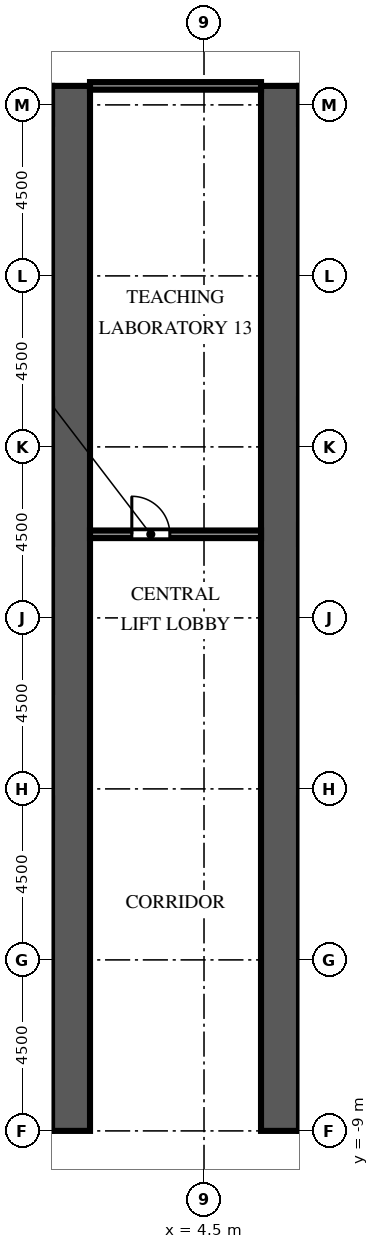
"""IFC4 building model, lengths in metres.
Left out: names, types, materials, properties, quantities, classifications, styles, units other than length and angle.
Written with IfcOpenShell. Run it as: python <this file> out.ifc"""

import sys

from ifc_helpers import new_model, si_unit, direction, frame, frame_2d, origin, place, context, subcontext, project, spatial, rectangle, extrude, element, fill, save


model = new_model("IFC4")
c1 = context("Model", 3, precision=1e-05, world=origin(), true_north=direction((0.0, 1.0)))
c2 = subcontext(c1, "Body", "Model", "MODEL_VIEW")
j1 = project(units=[si_unit("LENGTHUNIT", "METRE"), si_unit("PLANEANGLEUNIT", "RADIAN")], contexts=[c1])
p1 = place(None, origin())
s1 = spatial("IfcSite", under=j1, at=p1, CompositionType="ELEMENT")
p2 = place(p1, origin())
s2 = spatial("IfcBuilding", under=s1, at=p2, CompositionType="ELEMENT")
p3 = place(p2, frame((0.0, 0.0, 35.9)))
s3 = spatial("IfcBuildingStorey", under=s2, at=p3, CompositionType="ELEMENT", Elevation=35.9)
p4 = place(p3, frame((1.0, -9.0, 0.0), z_axis=(0.0, 0.0, 1.0), x_axis=(0.0, 1.0, 0.0)))
e1 = element("IfcWall", 1, at=p4, inside=s3, PredefinedType="SHEAR", context=c2, shape_type="SweptSolid", body=[
    extrude(rectangle(XDim=27.5, YDim=1.0, at=frame_2d((13.75, 0.0))), origin(), (0.0, 0.0, 1.0), 6.0),
])
p5 = place(p4, frame((12.55, 0.0, 0.0)))
e2 = element("IfcOpeningElement", 2, at=p5, cuts=e1, PredefinedType="OPENING", context=c2, shape_type="SweptSolid", body=[
    extrude(rectangle(XDim=2.4, YDim=2.4, at=frame_2d((1.2, 1.2))), frame((0.0, 0.51, 0.0), z_axis=(0.0, -1.0, 0.0), x_axis=(1.0, 0.0, 0.0)), (0.0, 0.0, 1.0), 1.02),
])
p6 = place(p4, frame((4.025, 0.0, 0.0)))
e3 = element("IfcOpeningElement", 3, at=p6, cuts=e1, PredefinedType="OPENING", context=c2, shape_type="SweptSolid", body=[
    extrude(rectangle(XDim=1.2, YDim=2.1, at=frame_2d((0.6, 1.05))), frame((0.0, 0.51, 0.0), z_axis=(0.0, -1.0, 0.0), x_axis=(1.0, 0.0, 0.0)), (0.0, 0.0, 1.0), 1.02),
])
p7 = place(p4, frame((19.475, 0.0, 0.0)))
e4 = element("IfcOpeningElement", 4, at=p7, cuts=e1, PredefinedType="OPENING", context=c2, shape_type="SweptSolid", body=[
    extrude(rectangle(XDim=1.0, YDim=2.1, at=frame_2d((0.5, 1.05))), frame((0.0, 0.51, 0.0), z_axis=(0.0, -1.0, 0.0), x_axis=(1.0, 0.0, 0.0)), (0.0, 0.0, 1.0), 1.02),
])
p8 = place(p4, frame((21.106, 0.0, 0.0)))
e5 = element("IfcOpeningElement", 5, at=p8, cuts=e1, PredefinedType="OPENING", context=c2, shape_type="SweptSolid", body=[
    extrude(rectangle(XDim=1.0, YDim=2.1, at=frame_2d((0.5, 1.05))), frame((0.0, 0.51, 0.0), z_axis=(0.0, -1.0, 0.0), x_axis=(1.0, 0.0, 0.0)), (0.0, 0.0, 1.0), 1.02),
])
p9 = place(p4, frame((23.1, 0.0, 0.0)))
e6 = element("IfcOpeningElement", 6, at=p9, cuts=e1, PredefinedType="OPENING", context=c2, shape_type="SweptSolid", body=[
    extrude(rectangle(XDim=1.0, YDim=2.1, at=frame_2d((0.5, 1.05))), frame((0.0, 0.51, 0.0), z_axis=(0.0, -1.0, 0.0), x_axis=(1.0, 0.0, 0.0)), (0.0, 0.0, 1.0), 1.02),
])
p10 = place(p4, frame((25.094, 0.0, 0.0)))
e7 = element("IfcOpeningElement", 7, at=p10, cuts=e1, PredefinedType="OPENING", context=c2, shape_type="SweptSolid", body=[
    extrude(rectangle(XDim=1.0, YDim=2.1, at=frame_2d((0.5, 1.05))), frame((0.0, 0.51, 0.0), z_axis=(0.0, -1.0, 0.0), x_axis=(1.0, 0.0, 0.0)), (0.0, 0.0, 1.0), 1.02),
])
p11 = place(p3, frame((6.5, -9.0, 0.0), z_axis=(0.0, 0.0, 1.0), x_axis=(0.0, 1.0, 0.0)))
e8 = element("IfcWall", 8, at=p11, inside=s3, PredefinedType="SHEAR", context=c2, shape_type="SweptSolid", body=[
    extrude(rectangle(XDim=27.5, YDim=1.0, at=frame_2d((13.75, 0.0))), origin(), (0.0, 0.0, 1.0), 6.0),
])
p12 = place(p11, frame((12.55, 0.0, 0.0)))
e9 = element("IfcOpeningElement", 9, at=p12, cuts=e8, PredefinedType="OPENING", context=c2, shape_type="SweptSolid", body=[
    extrude(rectangle(XDim=2.4, YDim=2.4, at=frame_2d((1.2, 1.2))), frame((0.0, 0.51, 0.0), z_axis=(0.0, -1.0, 0.0), x_axis=(1.0, 0.0, 0.0)), (0.0, 0.0, 1.0), 1.02),
])
p13 = place(p11, frame((4.025, 0.0, 0.0)))
e10 = element("IfcOpeningElement", 10, at=p13, cuts=e8, PredefinedType="OPENING", context=c2, shape_type="SweptSolid", body=[
    extrude(rectangle(XDim=1.2, YDim=2.1, at=frame_2d((0.6, 1.05))), frame((0.0, 0.51, 0.0), z_axis=(0.0, -1.0, 0.0), x_axis=(1.0, 0.0, 0.0)), (0.0, 0.0, 1.0), 1.02),
])
p14 = place(p11, frame((19.475, 0.0, 0.0)))
e11 = element("IfcOpeningElement", 11, at=p14, cuts=e8, PredefinedType="OPENING", context=c2, shape_type="SweptSolid", body=[
    extrude(rectangle(XDim=1.0, YDim=2.1, at=frame_2d((0.5, 1.05))), frame((0.0, 0.51, 0.0), z_axis=(0.0, -1.0, 0.0), x_axis=(1.0, 0.0, 0.0)), (0.0, 0.0, 1.0), 1.02),
])
p15 = place(p11, frame((21.106, 0.0, 0.0)))
e12 = element("IfcOpeningElement", 12, at=p15, cuts=e8, PredefinedType="OPENING", context=c2, shape_type="SweptSolid", body=[
    extrude(rectangle(XDim=1.0, YDim=2.1, at=frame_2d((0.5, 1.05))), frame((0.0, 0.51, 0.0), z_axis=(0.0, -1.0, 0.0), x_axis=(1.0, 0.0, 0.0)), (0.0, 0.0, 1.0), 1.02),
])
p16 = place(p11, frame((23.1, 0.0, 0.0)))
e13 = element("IfcOpeningElement", 13, at=p16, cuts=e8, PredefinedType="OPENING", context=c2, shape_type="SweptSolid", body=[
    extrude(rectangle(XDim=1.0, YDim=2.1, at=frame_2d((0.5, 1.05))), frame((0.0, 0.51, 0.0), z_axis=(0.0, -1.0, 0.0), x_axis=(1.0, 0.0, 0.0)), (0.0, 0.0, 1.0), 1.02),
])
p17 = place(p11, frame((25.094, 0.0, 0.0)))
e14 = element("IfcOpeningElement", 14, at=p17, cuts=e8, PredefinedType="OPENING", context=c2, shape_type="SweptSolid", body=[
    extrude(rectangle(XDim=1.0, YDim=2.1, at=frame_2d((0.5, 1.05))), frame((0.0, 0.51, 0.0), z_axis=(0.0, -1.0, 0.0), x_axis=(1.0, 0.0, 0.0)), (0.0, 0.0, 1.0), 1.02),
])
p18 = place(p3, frame((1.5, 6.7, 0.0), z_axis=(0.0, 0.0, 1.0), x_axis=(1.0, 0.0, 0.0)))
e15 = element("IfcWall", 15, at=p18, inside=s3, PredefinedType="PARTITIONING", context=c2, shape_type="SweptSolid", body=[
    extrude(rectangle(XDim=4.5, YDim=0.2, at=frame_2d((2.25, 0.0))), origin(), (0.0, 0.0, 1.0), 5.55),
])
p19 = place(p18, frame((1.1, 0.0, 0.0)))
e16 = element("IfcOpeningElement", 16, at=p19, cuts=e15, PredefinedType="OPENING", context=c2, shape_type="SweptSolid", body=[
    extrude(rectangle(XDim=1.0, YDim=2.1, at=frame_2d((0.5, 1.05))), frame((0.0, 0.11, 0.0), z_axis=(0.0, -1.0, 0.0), x_axis=(1.0, 0.0, 0.0)), (0.0, 0.0, 1.0), 0.22),
])
p20 = place(p3, frame((1.5, 18.5, 0.0), z_axis=(0.0, 0.0, 1.0), x_axis=(1.0, 0.0, 0.0)))
e17 = element("IfcWall", 17, at=p20, inside=s3, PredefinedType="PARTITIONING", context=c2, shape_type="SweptSolid", body=[
    extrude(rectangle(XDim=4.5, YDim=0.2, at=frame_2d((2.25, 0.0))), origin(), (0.0, 0.0, 1.0), 5.55),
])
p21 = place(p5, origin())
e18 = element("IfcDoor", 18, at=p21, inside=s3, OperationType="DOUBLE_DOOR_DOUBLE_SWING", PredefinedType="DOOR", context=c2, shape_type="SweptSolid", body=[
    extrude(rectangle(XDim=2.4, YDim=2.4, at=frame_2d((1.2, 1.2))), frame((0.0, 0.025, 0.0), z_axis=(0.0, -1.0, 0.0), x_axis=(1.0, 0.0, 0.0)), (0.0, 0.0, 1.0), 0.05),
])
fill(e2, e18)
p22 = place(p12, origin())
e19 = element("IfcDoor", 19, at=p22, inside=s3, OperationType="DOUBLE_DOOR_DOUBLE_SWING", PredefinedType="DOOR", context=c2, shape_type="SweptSolid", body=[
    extrude(rectangle(XDim=2.4, YDim=2.4, at=frame_2d((1.2, 1.2))), frame((0.0, 0.025, 0.0), z_axis=(0.0, -1.0, 0.0), x_axis=(1.0, 0.0, 0.0)), (0.0, 0.0, 1.0), 0.05),
])
fill(e9, e19)
p23 = place(p6, origin())
e20 = element("IfcDoor", 20, at=p23, inside=s3, OperationType="SINGLE_SWING_LEFT", PredefinedType="DOOR", context=c2, shape_type="SweptSolid", body=[
    extrude(rectangle(XDim=1.2, YDim=2.1, at=frame_2d((0.6, 1.05))), frame((0.0, 0.475, 0.0), z_axis=(0.0, -1.0, 0.0), x_axis=(1.0, 0.0, 0.0)), (0.0, 0.0, 1.0), 0.05),
])
fill(e3, e20)
p24 = place(p7, origin())
e21 = element("IfcDoor", 21, at=p24, inside=s3, OperationType="SINGLE_SWING_LEFT", PredefinedType="DOOR", context=c2, shape_type="SweptSolid", body=[
    extrude(rectangle(XDim=1.0, YDim=2.1, at=frame_2d((0.5, 1.05))), frame((0.0, 0.475, 0.0), z_axis=(0.0, -1.0, 0.0), x_axis=(1.0, 0.0, 0.0)), (0.0, 0.0, 1.0), 0.05),
])
fill(e4, e21)
p25 = place(p8, origin())
e22 = element("IfcDoor", 22, at=p25, inside=s3, OperationType="SINGLE_SWING_RIGHT", PredefinedType="DOOR", context=c2, shape_type="SweptSolid", body=[
    extrude(rectangle(XDim=1.0, YDim=2.1, at=frame_2d((0.5, 1.05))), frame((0.0, 0.475, 0.0), z_axis=(0.0, -1.0, 0.0), x_axis=(1.0, 0.0, 0.0)), (0.0, 0.0, 1.0), 0.05),
])
fill(e5, e22)
p26 = place(p9, origin())
e23 = element("IfcDoor", 23, at=p26, inside=s3, OperationType="SINGLE_SWING_LEFT", PredefinedType="DOOR", context=c2, shape_type="SweptSolid", body=[
    extrude(rectangle(XDim=1.0, YDim=2.1, at=frame_2d((0.5, 1.05))), frame((0.0, 0.475, 0.0), z_axis=(0.0, -1.0, 0.0), x_axis=(1.0, 0.0, 0.0)), (0.0, 0.0, 1.0), 0.05),
])
fill(e6, e23)
p27 = place(p10, origin())
e24 = element("IfcDoor", 24, at=p27, inside=s3, OperationType="SINGLE_SWING_RIGHT", PredefinedType="DOOR", context=c2, shape_type="SweptSolid", body=[
    extrude(rectangle(XDim=1.0, YDim=2.1, at=frame_2d((0.5, 1.05))), frame((0.0, 0.475, 0.0), z_axis=(0.0, -1.0, 0.0), x_axis=(1.0, 0.0, 0.0)), (0.0, 0.0, 1.0), 0.05),
])
fill(e7, e24)
p28 = place(p13, origin())
e25 = element("IfcDoor", 25, at=p28, inside=s3, OperationType="SINGLE_SWING_RIGHT", PredefinedType="DOOR", context=c2, shape_type="SweptSolid", body=[
    extrude(rectangle(XDim=1.2, YDim=2.1, at=frame_2d((0.6, 1.05))), frame((0.0, -0.425, 0.0), z_axis=(0.0, -1.0, 0.0), x_axis=(1.0, 0.0, 0.0)), (0.0, 0.0, 1.0), 0.05),
])
fill(e10, e25)
p29 = place(p14, origin())
e26 = element("IfcDoor", 26, at=p29, inside=s3, OperationType="SINGLE_SWING_RIGHT", PredefinedType="DOOR", context=c2, shape_type="SweptSolid", body=[
    extrude(rectangle(XDim=1.0, YDim=2.1, at=frame_2d((0.5, 1.05))), frame((0.0, -0.425, 0.0), z_axis=(0.0, -1.0, 0.0), x_axis=(1.0, 0.0, 0.0)), (0.0, 0.0, 1.0), 0.05),
])
fill(e11, e26)
p30 = place(p15, origin())
e27 = element("IfcDoor", 27, at=p30, inside=s3, OperationType="SINGLE_SWING_LEFT", PredefinedType="DOOR", context=c2, shape_type="SweptSolid", body=[
    extrude(rectangle(XDim=1.0, YDim=2.1, at=frame_2d((0.5, 1.05))), frame((0.0, -0.425, 0.0), z_axis=(0.0, -1.0, 0.0), x_axis=(1.0, 0.0, 0.0)), (0.0, 0.0, 1.0), 0.05),
])
fill(e12, e27)
p31 = place(p16, origin())
e28 = element("IfcDoor", 28, at=p31, inside=s3, OperationType="SINGLE_SWING_RIGHT", PredefinedType="DOOR", context=c2, shape_type="SweptSolid", body=[
    extrude(rectangle(XDim=1.0, YDim=2.1, at=frame_2d((0.5, 1.05))), frame((0.0, -0.425, 0.0), z_axis=(0.0, -1.0, 0.0), x_axis=(1.0, 0.0, 0.0)), (0.0, 0.0, 1.0), 0.05),
])
fill(e13, e28)
p32 = place(p17, origin())
e29 = element("IfcDoor", 29, at=p32, inside=s3, OperationType="SINGLE_SWING_LEFT", PredefinedType="DOOR", context=c2, shape_type="SweptSolid", body=[
    extrude(rectangle(XDim=1.0, YDim=2.1, at=frame_2d((0.5, 1.05))), frame((0.0, -0.425, 0.0), z_axis=(0.0, -1.0, 0.0), x_axis=(1.0, 0.0, 0.0)), (0.0, 0.0, 1.0), 0.05),
])
fill(e14, e29)
p33 = place(p19, origin())
e30 = element("IfcDoor", 30, at=p33, inside=s3, OperationType="SINGLE_SWING_LEFT", PredefinedType="DOOR", context=c2, shape_type="SweptSolid", body=[
    extrude(rectangle(XDim=1.0, YDim=2.1, at=frame_2d((0.5, 1.05))), frame((0.0, 0.025, 0.0), z_axis=(0.0, -1.0, 0.0), x_axis=(1.0, 0.0, 0.0)), (0.0, 0.0, 1.0), 0.05),
])
fill(e16, e30)
save(model, sys.argv[1])
